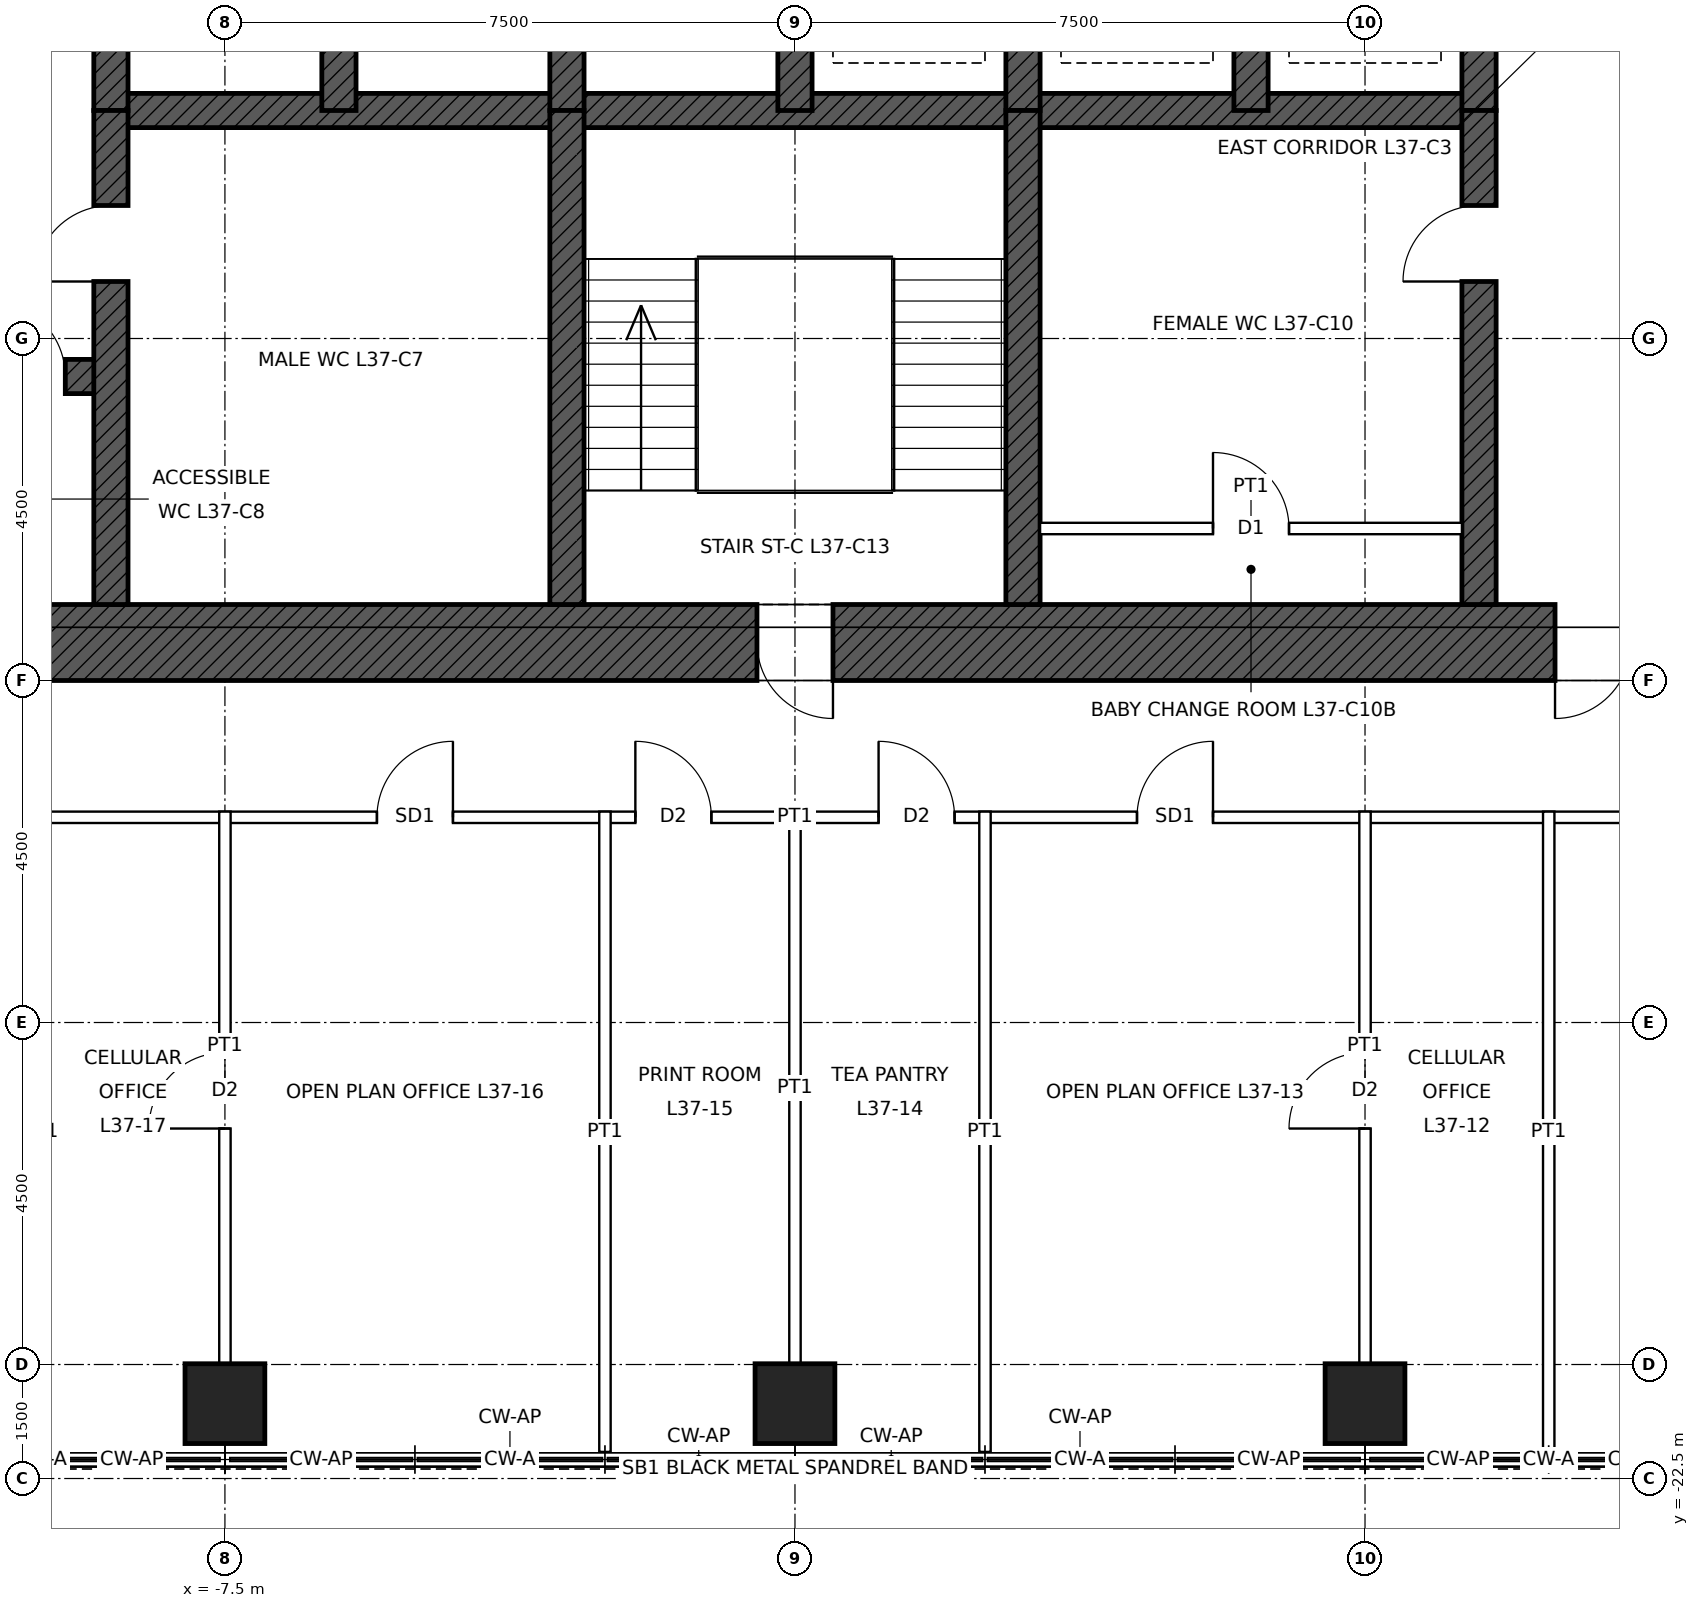
"""IFC4 building model, lengths in metres.
Left out: names, types, materials, properties, quantities, classifications, styles, units other than length and angle.
Written with IfcOpenShell. Run it as: python <this file> out.ifc"""

import sys

from ifc_helpers import new_model, si_unit, direction, frame, frame_2d, origin, origin_2d, place, context, subcontext, project, spatial, rectangle, hollow_rectangle, extrude, element, fill, save


model = new_model("IFC4")
c1 = context("Model", 3, precision=1e-05, world=origin(), true_north=direction((0.0, 1.0)))
c2 = subcontext(c1, "Body", "Model", "MODEL_VIEW")
j1 = project(units=[si_unit("LENGTHUNIT", "METRE"), si_unit("PLANEANGLEUNIT", "RADIAN")], contexts=[c1])
p1 = place(None, origin())
s1 = spatial("IfcSite", under=j1, at=p1, CompositionType="ELEMENT")
p2 = place(p1, origin())
s2 = spatial("IfcBuilding", under=s1, at=p2, CompositionType="ELEMENT")
p3 = place(p2, frame((0.0, 0.0, 181.9)))
s3 = spatial("IfcBuildingStorey", under=s2, at=p3, CompositionType="ELEMENT", Elevation=181.9)
p4 = place(p3, frame((7.5, -21.515, 0.0), z_axis=(0.0, 0.0, 1.0), x_axis=(1.0, 0.0, 0.0)))
e1 = element("IfcColumn", 1, at=p4, inside=s3, PredefinedType="COLUMN", context=c2, shape_type="SweptSolid", body=[
    extrude(hollow_rectangle(XDim=1.05, YDim=1.05, WallThickness=0.075, at=origin_2d()), origin(), (0.0, 0.0, 1.0), 4.0),
])
p5 = place(p3, frame((0.0, -21.515, 0.0), z_axis=(0.0, 0.0, 1.0), x_axis=(1.0, 0.0, 0.0)))
e2 = element("IfcColumn", 2, at=p5, inside=s3, PredefinedType="COLUMN", context=c2, shape_type="SweptSolid", body=[
    extrude(hollow_rectangle(XDim=1.05, YDim=1.05, WallThickness=0.07, at=origin_2d()), origin(), (0.0, 0.0, 1.0), 4.0),
])
p6 = place(p3, frame((-7.5, -21.515, 0.0), z_axis=(0.0, 0.0, 1.0), x_axis=(1.0, 0.0, 0.0)))
e3 = element("IfcColumn", 3, at=p6, inside=s3, PredefinedType="COLUMN", context=c2, shape_type="SweptSolid", body=[
    extrude(hollow_rectangle(XDim=1.05, YDim=1.05, WallThickness=0.075, at=origin_2d()), origin(), (0.0, 0.0, 1.0), 4.0),
])
p7 = place(p3, frame((12.0, -11.5, 0.0), z_axis=(0.0, 0.0, 1.0), x_axis=(-1.0, 0.0, 0.0)))
e4 = element("IfcWall", 4, at=p7, inside=s3, PredefinedType="SHEAR", context=c2, shape_type="SweptSolid", body=[
    extrude(rectangle(XDim=24.0, YDim=1.0, at=frame_2d((12.0, 0.0))), origin(), (0.0, 0.0, 1.0), 4.0),
])
p8 = place(p7, frame((11.5, 0.0, 0.0)))
e5 = element("IfcOpeningElement", 5, at=p8, cuts=e4, PredefinedType="OPENING", context=c2, shape_type="SweptSolid", body=[
    extrude(rectangle(XDim=1.0, YDim=2.1, at=frame_2d((0.5, 1.05))), frame((0.0, 0.51, 0.0), z_axis=(0.0, -1.0, 0.0), x_axis=(1.0, 0.0, 0.0)), (0.0, 0.0, 1.0), 1.02),
])
p9 = place(p7, frame((1.0, 0.0, 0.0)))
e6 = element("IfcOpeningElement", 6, at=p9, cuts=e4, PredefinedType="OPENING", context=c2, shape_type="SweptSolid", body=[
    extrude(rectangle(XDim=1.0, YDim=2.4, at=frame_2d((0.5, 1.2))), frame((0.0, 0.51, 0.0), z_axis=(0.0, -1.0, 0.0), x_axis=(1.0, 0.0, 0.0)), (0.0, 0.0, 1.0), 1.02),
])
p10 = place(p3, frame((-9.0, -4.5, 0.0), z_axis=(0.0, 0.0, 1.0), x_axis=(1.0, 0.0, 0.0)))
e7 = element("IfcWall", 7, at=p10, inside=s3, PredefinedType="SHEAR", context=c2, shape_type="SweptSolid", body=[
    extrude(rectangle(XDim=18.0, YDim=0.45, at=frame_2d((9.0, 0.0))), origin(), (0.0, 0.0, 1.0), 4.0),
])
p11 = place(p3, frame((-11.0, -8.0, 0.0), z_axis=(0.0, 0.0, 1.0), x_axis=(1.0, 0.0, 0.0)))
e8 = element("IfcWall", 8, at=p11, inside=s3, PredefinedType="SHEAR", context=c2, shape_type="SweptSolid", body=[
    extrude(rectangle(XDim=2.0, YDim=0.45, at=frame_2d((1.0, 0.0))), origin(), (0.0, 0.0, 1.0), 4.0),
])
p12 = place(p11, frame((0.4, 0.0, 0.0)))
e9 = element("IfcOpeningElement", 9, at=p12, cuts=e8, PredefinedType="OPENING", context=c2, shape_type="SweptSolid", body=[
    extrude(rectangle(XDim=1.0, YDim=2.1, at=frame_2d((0.5, 1.05))), frame((0.0, 0.235, 0.0), z_axis=(0.0, -1.0, 0.0), x_axis=(1.0, 0.0, 0.0)), (0.0, 0.0, 1.0), 0.47),
])
for number, where, z_axis, x_axis in (
    (10, (-9.0, -4.5, 0.0), (0.0, 0.0, 1.0), (0.0, 1.0, 0.0)),
    (11, (9.0, -4.5, 0.0), (0.0, 0.0, 1.0), (0.0, 1.0, 0.0)),
    (12, (-6.0, -4.5, 0.0), (0.0, 0.0, 1.0), (0.0, 1.0, 0.0)),
    (13, (-3.0, -4.5, 0.0), (0.0, 0.0, 1.0), (0.0, 1.0, 0.0)),
    (14, (0.0, -4.5, 0.0), (0.0, 0.0, 1.0), (0.0, 1.0, 0.0)),
    (15, (3.0, -4.5, 0.0), (0.0, 0.0, 1.0), (0.0, 1.0, 0.0)),
    (16, (6.0, -4.5, 0.0), (0.0, 0.0, 1.0), (0.0, 1.0, 0.0)),
):
    element("IfcWall", number, at=place(p3, frame(where, z_axis=z_axis, x_axis=x_axis)), inside=s3, PredefinedType="SHEAR", context=c2, shape_type="SweptSolid", body=[
        extrude(rectangle(XDim=3.0, YDim=0.45, at=frame_2d((1.5, 0.0))), origin(), (0.0, 0.0, 1.0), 4.0),
    ])
p13 = place(p3, frame((-9.0, -11.0, 0.0), z_axis=(0.0, 0.0, 1.0), x_axis=(0.0, 1.0, 0.0)))
e17 = element("IfcWall", 17, at=p13, inside=s3, PredefinedType="SHEAR", context=c2, shape_type="SweptSolid", body=[
    extrude(rectangle(XDim=6.5, YDim=0.45, at=frame_2d((3.25, 0.0))), origin(), (0.0, 0.0, 1.0), 4.0),
])
p14 = place(p13, frame((4.25, 0.0, 0.0)))
e18 = element("IfcOpeningElement", 18, at=p14, cuts=e17, PredefinedType="OPENING", context=c2, shape_type="SweptSolid", body=[
    extrude(rectangle(XDim=1.0, YDim=2.1, at=frame_2d((0.5, 1.05))), frame((0.0, 0.235, 0.0), z_axis=(0.0, -1.0, 0.0), x_axis=(1.0, 0.0, 0.0)), (0.0, 0.0, 1.0), 0.47),
])
p15 = place(p3, frame((9.0, -11.0, 0.0), z_axis=(0.0, 0.0, 1.0), x_axis=(0.0, 1.0, 0.0)))
e19 = element("IfcWall", 19, at=p15, inside=s3, PredefinedType="SHEAR", context=c2, shape_type="SweptSolid", body=[
    extrude(rectangle(XDim=6.5, YDim=0.45, at=frame_2d((3.25, 0.0))), origin(), (0.0, 0.0, 1.0), 4.0),
])
p16 = place(p15, frame((4.25, 0.0, 0.0)))
e20 = element("IfcOpeningElement", 20, at=p16, cuts=e19, PredefinedType="OPENING", context=c2, shape_type="SweptSolid", body=[
    extrude(rectangle(XDim=1.0, YDim=2.1, at=frame_2d((0.5, 1.05))), frame((0.0, 0.235, 0.0), z_axis=(0.0, -1.0, 0.0), x_axis=(1.0, 0.0, 0.0)), (0.0, 0.0, 1.0), 0.47),
])
for number, where, z_axis, x_axis in (
    (21, (-3.0, -11.0, 0.0), (0.0, 0.0, 1.0), (0.0, 1.0, 0.0)),
    (22, (3.0, -11.0, 0.0), (0.0, 0.0, 1.0), (0.0, 1.0, 0.0)),
):
    element("IfcWall", number, at=place(p3, frame(where, z_axis=z_axis, x_axis=x_axis)), inside=s3, PredefinedType="SHEAR", context=c2, shape_type="SweptSolid", body=[
        extrude(rectangle(XDim=6.5, YDim=0.45, at=frame_2d((3.25, 0.0))), origin(), (0.0, 0.0, 1.0), 4.0),
    ])
p17 = place(p3, frame((-13.875, -13.8, 0.0), z_axis=(0.0, 0.0, 1.0), x_axis=(1.0, 0.0, 0.0)))
e23 = element("IfcWall", 23, at=p17, inside=s3, PredefinedType="PARTITIONING", context=c2, shape_type="SweptSolid", body=[
    extrude(rectangle(XDim=27.75, YDim=0.15, at=frame_2d((13.875, 0.0))), origin(), (0.0, 0.0, 1.0), 3.85),
])
p18 = place(p17, frame((18.375, 0.0, 0.0)))
e24 = element("IfcOpeningElement", 24, at=p18, cuts=e23, PredefinedType="OPENING", context=c2, shape_type="SweptSolid", body=[
    extrude(rectangle(XDim=1.0, YDim=2.4, at=frame_2d((0.5, 1.2))), frame((0.0, 0.085, 0.0), z_axis=(0.0, -1.0, 0.0), x_axis=(1.0, 0.0, 0.0)), (0.0, 0.0, 1.0), 0.17),
])
p19 = place(p17, frame((14.975, 0.0, 0.0)))
e25 = element("IfcOpeningElement", 25, at=p19, cuts=e23, PredefinedType="OPENING", context=c2, shape_type="SweptSolid", body=[
    extrude(rectangle(XDim=1.0, YDim=2.1, at=frame_2d((0.5, 1.05))), frame((0.0, 0.085, 0.0), z_axis=(0.0, -1.0, 0.0), x_axis=(1.0, 0.0, 0.0)), (0.0, 0.0, 1.0), 0.17),
])
p20 = place(p17, frame((11.775, 0.0, 0.0)))
e26 = element("IfcOpeningElement", 26, at=p20, cuts=e23, PredefinedType="OPENING", context=c2, shape_type="SweptSolid", body=[
    extrude(rectangle(XDim=1.0, YDim=2.1, at=frame_2d((0.5, 1.05))), frame((0.0, 0.085, 0.0), z_axis=(0.0, -1.0, 0.0), x_axis=(1.0, 0.0, 0.0)), (0.0, 0.0, 1.0), 0.17),
])
p21 = place(p17, frame((8.375, 0.0, 0.0)))
e27 = element("IfcOpeningElement", 27, at=p21, cuts=e23, PredefinedType="OPENING", context=c2, shape_type="SweptSolid", body=[
    extrude(rectangle(XDim=1.0, YDim=2.4, at=frame_2d((0.5, 1.2))), frame((0.0, 0.085, 0.0), z_axis=(0.0, -1.0, 0.0), x_axis=(1.0, 0.0, 0.0)), (0.0, 0.0, 1.0), 0.17),
])
p22 = place(p17, frame((25.65, 0.0, 0.0)))
e28 = element("IfcOpeningElement", 28, at=p22, cuts=e23, PredefinedType="OPENING", context=c2, shape_type="SweptSolid", body=[
    extrude(rectangle(XDim=1.0, YDim=2.4, at=frame_2d((0.5, 1.2))), frame((0.0, 0.085, 0.0), z_axis=(0.0, -1.0, 0.0), x_axis=(1.0, 0.0, 0.0)), (0.0, 0.0, 1.0), 0.17),
])
p23 = place(p17, frame((1.517, 0.0, 0.0)))
e29 = element("IfcOpeningElement", 29, at=p23, cuts=e23, PredefinedType="OPENING", context=c2, shape_type="SweptSolid", body=[
    extrude(rectangle(XDim=1.0, YDim=2.4, at=frame_2d((0.5, 1.2))), frame((0.0, 0.085, 0.0), z_axis=(0.0, -1.0, 0.0), x_axis=(1.0, 0.0, 0.0)), (0.0, 0.0, 1.0), 0.17),
])
p24 = place(p3, frame((-7.5, -20.99, 0.0), z_axis=(0.0, 0.0, 1.0), x_axis=(0.0, 1.0, 0.0)))
e30 = element("IfcWall", 30, at=p24, inside=s3, PredefinedType="PARTITIONING", context=c2, shape_type="SweptSolid", body=[
    extrude(rectangle(XDim=7.265, YDim=0.15, at=frame_2d((3.632, 0.0))), origin(), (0.0, 0.0, 1.0), 3.238),
])
p25 = place(p24, frame((3.095, 0.0, 0.0)))
e31 = element("IfcOpeningElement", 31, at=p25, cuts=e30, PredefinedType="OPENING", context=c2, shape_type="SweptSolid", body=[
    extrude(rectangle(XDim=1.0, YDim=2.1, at=frame_2d((0.5, 1.05))), frame((0.0, 0.085, 0.0), z_axis=(0.0, -1.0, 0.0), x_axis=(1.0, 0.0, 0.0)), (0.0, 0.0, 1.0), 0.17),
])
p26 = place(p3, frame((-2.5, -22.15, 0.0), z_axis=(0.0, 0.0, 1.0), x_axis=(0.0, 1.0, 0.0)))
e32 = element("IfcWall", 32, at=p26, inside=s3, PredefinedType="PARTITIONING", context=c2, shape_type="SweptSolid", body=[
    extrude(rectangle(XDim=8.425, YDim=0.15, at=frame_2d((4.212, 0.0))), origin(), (0.0, 0.0, 1.0), 3.85),
])
p27 = place(p3, frame((0.0, -20.99, 0.0), z_axis=(0.0, 0.0, 1.0), x_axis=(0.0, 1.0, 0.0)))
e33 = element("IfcWall", 33, at=p27, inside=s3, PredefinedType="PARTITIONING", context=c2, shape_type="SweptSolid", body=[
    extrude(rectangle(XDim=7.265, YDim=0.15, at=frame_2d((3.632, 0.0))), origin(), (0.0, 0.0, 1.0), 3.238),
])
p28 = place(p3, frame((2.5, -22.15, 0.0), z_axis=(0.0, 0.0, 1.0), x_axis=(0.0, 1.0, 0.0)))
e34 = element("IfcWall", 34, at=p28, inside=s3, PredefinedType="PARTITIONING", context=c2, shape_type="SweptSolid", body=[
    extrude(rectangle(XDim=8.425, YDim=0.15, at=frame_2d((4.212, 0.0))), origin(), (0.0, 0.0, 1.0), 3.85),
])
p29 = place(p3, frame((7.5, -20.99, 0.0), z_axis=(0.0, 0.0, 1.0), x_axis=(0.0, 1.0, 0.0)))
e35 = element("IfcWall", 35, at=p29, inside=s3, PredefinedType="PARTITIONING", context=c2, shape_type="SweptSolid", body=[
    extrude(rectangle(XDim=7.265, YDim=0.15, at=frame_2d((3.632, 0.0))), origin(), (0.0, 0.0, 1.0), 3.238),
])
p30 = place(p29, frame((3.095, 0.0, 0.0)))
e36 = element("IfcOpeningElement", 36, at=p30, cuts=e35, PredefinedType="OPENING", context=c2, shape_type="SweptSolid", body=[
    extrude(rectangle(XDim=1.0, YDim=2.1, at=frame_2d((0.5, 1.05))), frame((0.0, 0.085, 0.0), z_axis=(0.0, -1.0, 0.0), x_axis=(1.0, 0.0, 0.0)), (0.0, 0.0, 1.0), 0.17),
])
p31 = place(p3, frame((9.917, -22.15, 0.0), z_axis=(0.0, 0.0, 1.0), x_axis=(0.0, 1.0, 0.0)))
e37 = element("IfcWall", 37, at=p31, inside=s3, PredefinedType="PARTITIONING", context=c2, shape_type="SweptSolid", body=[
    extrude(rectangle(XDim=8.425, YDim=0.15, at=frame_2d((4.212, 0.0))), origin(), (0.0, 0.0, 1.0), 3.85),
])
p32 = place(p3, frame((3.225, -10.0, 0.0), z_axis=(0.0, 0.0, 1.0), x_axis=(1.0, 0.0, 0.0)))
e38 = element("IfcWall", 38, at=p32, inside=s3, PredefinedType="PARTITIONING", context=c2, shape_type="SweptSolid", body=[
    extrude(rectangle(XDim=5.55, YDim=0.15, at=frame_2d((2.775, 0.0))), origin(), (0.0, 0.0, 1.0), 3.75),
])
p33 = place(p32, frame((2.275, 0.0, 0.0)))
e39 = element("IfcOpeningElement", 39, at=p33, cuts=e38, PredefinedType="OPENING", context=c2, shape_type="SweptSolid", body=[
    extrude(rectangle(XDim=1.0, YDim=2.1, at=frame_2d((0.5, 1.05))), frame((0.0, 0.085, 0.0), z_axis=(0.0, -1.0, 0.0), x_axis=(1.0, 0.0, 0.0)), (0.0, 0.0, 1.0), 0.17),
])
p34 = place(p8, origin())
e40 = element("IfcDoor", 40, at=p34, inside=s3, OperationType="SINGLE_SWING_LEFT", PredefinedType="DOOR", context=c2, shape_type="SweptSolid", body=[
    extrude(rectangle(XDim=1.0, YDim=2.1, at=frame_2d((0.5, 1.05))), frame((0.0, 0.485, 0.0), z_axis=(0.0, -1.0, 0.0), x_axis=(1.0, 0.0, 0.0)), (0.0, 0.0, 1.0), 0.05),
])
fill(e5, e40)
p35 = place(p9, origin())
e41 = element("IfcDoor", 41, at=p35, inside=s3, OperationType="SINGLE_SWING_RIGHT", PredefinedType="DOOR", context=c2, shape_type="SweptSolid", body=[
    extrude(rectangle(XDim=1.0, YDim=2.4, at=frame_2d((0.5, 1.2))), frame((0.0, 0.485, 0.0), z_axis=(0.0, -1.0, 0.0), x_axis=(1.0, 0.0, 0.0)), (0.0, 0.0, 1.0), 0.05),
])
fill(e6, e41)
p36 = place(p14, origin())
e42 = element("IfcDoor", 42, at=p36, inside=s3, OperationType="SINGLE_SWING_LEFT", PredefinedType="DOOR", context=c2, shape_type="SweptSolid", body=[
    extrude(rectangle(XDim=1.0, YDim=2.1, at=frame_2d((0.5, 1.05))), frame((0.0, 0.025, 0.0), z_axis=(0.0, -1.0, 0.0), x_axis=(1.0, 0.0, 0.0)), (0.0, 0.0, 1.0), 0.05),
])
fill(e18, e42)
p37 = place(p16, origin())
e43 = element("IfcDoor", 43, at=p37, inside=s3, OperationType="SINGLE_SWING_LEFT", PredefinedType="DOOR", context=c2, shape_type="SweptSolid", body=[
    extrude(rectangle(XDim=1.0, YDim=2.1, at=frame_2d((0.5, 1.05))), frame((0.0, 0.025, 0.0), z_axis=(0.0, -1.0, 0.0), x_axis=(1.0, 0.0, 0.0)), (0.0, 0.0, 1.0), 0.05),
])
fill(e20, e43)
p38 = place(p12, origin())
e44 = element("IfcDoor", 44, at=p38, inside=s3, OperationType="SINGLE_SWING_LEFT", PredefinedType="DOOR", context=c2, shape_type="SweptSolid", body=[
    extrude(rectangle(XDim=1.0, YDim=2.1, at=frame_2d((0.5, 1.05))), frame((0.0, 0.025, 0.0), z_axis=(0.0, -1.0, 0.0), x_axis=(1.0, 0.0, 0.0)), (0.0, 0.0, 1.0), 0.05),
])
fill(e9, e44)
p39 = place(p33, origin())
e45 = element("IfcDoor", 45, at=p39, inside=s3, OperationType="SINGLE_SWING_LEFT", PredefinedType="DOOR", context=c2, shape_type="SweptSolid", body=[
    extrude(rectangle(XDim=1.0, YDim=2.1, at=frame_2d((0.5, 1.05))), frame((0.0, 0.025, 0.0), z_axis=(0.0, -1.0, 0.0), x_axis=(1.0, 0.0, 0.0)), (0.0, 0.0, 1.0), 0.05),
])
fill(e39, e45)
p40 = place(p30, origin())
e46 = element("IfcDoor", 46, at=p40, inside=s3, OperationType="SINGLE_SWING_LEFT", PredefinedType="DOOR", context=c2, shape_type="SweptSolid", body=[
    extrude(rectangle(XDim=1.0, YDim=2.1, at=frame_2d((0.5, 1.05))), frame((0.0, 0.025, 0.0), z_axis=(0.0, -1.0, 0.0), x_axis=(1.0, 0.0, 0.0)), (0.0, 0.0, 1.0), 0.05),
])
fill(e36, e46)
p41 = place(p18, origin())
e47 = element("IfcDoor", 47, at=p41, inside=s3, OperationType="SINGLE_SWING_RIGHT", PredefinedType="DOOR", context=c2, shape_type="SweptSolid", body=[
    extrude(rectangle(XDim=1.0, YDim=2.4, at=frame_2d((0.5, 1.2))), frame((0.0, 0.025, 0.0), z_axis=(0.0, -1.0, 0.0), x_axis=(1.0, 0.0, 0.0)), (0.0, 0.0, 1.0), 0.05),
])
fill(e24, e47)
p42 = place(p19, origin())
e48 = element("IfcDoor", 48, at=p42, inside=s3, OperationType="SINGLE_SWING_LEFT", PredefinedType="DOOR", context=c2, shape_type="SweptSolid", body=[
    extrude(rectangle(XDim=1.0, YDim=2.1, at=frame_2d((0.5, 1.05))), frame((0.0, 0.025, 0.0), z_axis=(0.0, -1.0, 0.0), x_axis=(1.0, 0.0, 0.0)), (0.0, 0.0, 1.0), 0.05),
])
fill(e25, e48)
p43 = place(p20, origin())
e49 = element("IfcDoor", 49, at=p43, inside=s3, OperationType="SINGLE_SWING_LEFT", PredefinedType="DOOR", context=c2, shape_type="SweptSolid", body=[
    extrude(rectangle(XDim=1.0, YDim=2.1, at=frame_2d((0.5, 1.05))), frame((0.0, 0.025, 0.0), z_axis=(0.0, -1.0, 0.0), x_axis=(1.0, 0.0, 0.0)), (0.0, 0.0, 1.0), 0.05),
])
fill(e26, e49)
p44 = place(p21, origin())
e50 = element("IfcDoor", 50, at=p44, inside=s3, OperationType="SINGLE_SWING_RIGHT", PredefinedType="DOOR", context=c2, shape_type="SweptSolid", body=[
    extrude(rectangle(XDim=1.0, YDim=2.4, at=frame_2d((0.5, 1.2))), frame((0.0, 0.025, 0.0), z_axis=(0.0, -1.0, 0.0), x_axis=(1.0, 0.0, 0.0)), (0.0, 0.0, 1.0), 0.05),
])
fill(e27, e50)
p45 = place(p25, origin())
e51 = element("IfcDoor", 51, at=p45, inside=s3, OperationType="SINGLE_SWING_LEFT", PredefinedType="DOOR", context=c2, shape_type="SweptSolid", body=[
    extrude(rectangle(XDim=1.0, YDim=2.1, at=frame_2d((0.5, 1.05))), frame((0.0, 0.025, 0.0), z_axis=(0.0, -1.0, 0.0), x_axis=(1.0, 0.0, 0.0)), (0.0, 0.0, 1.0), 0.05),
])
fill(e31, e51)
save(model, sys.argv[1])
